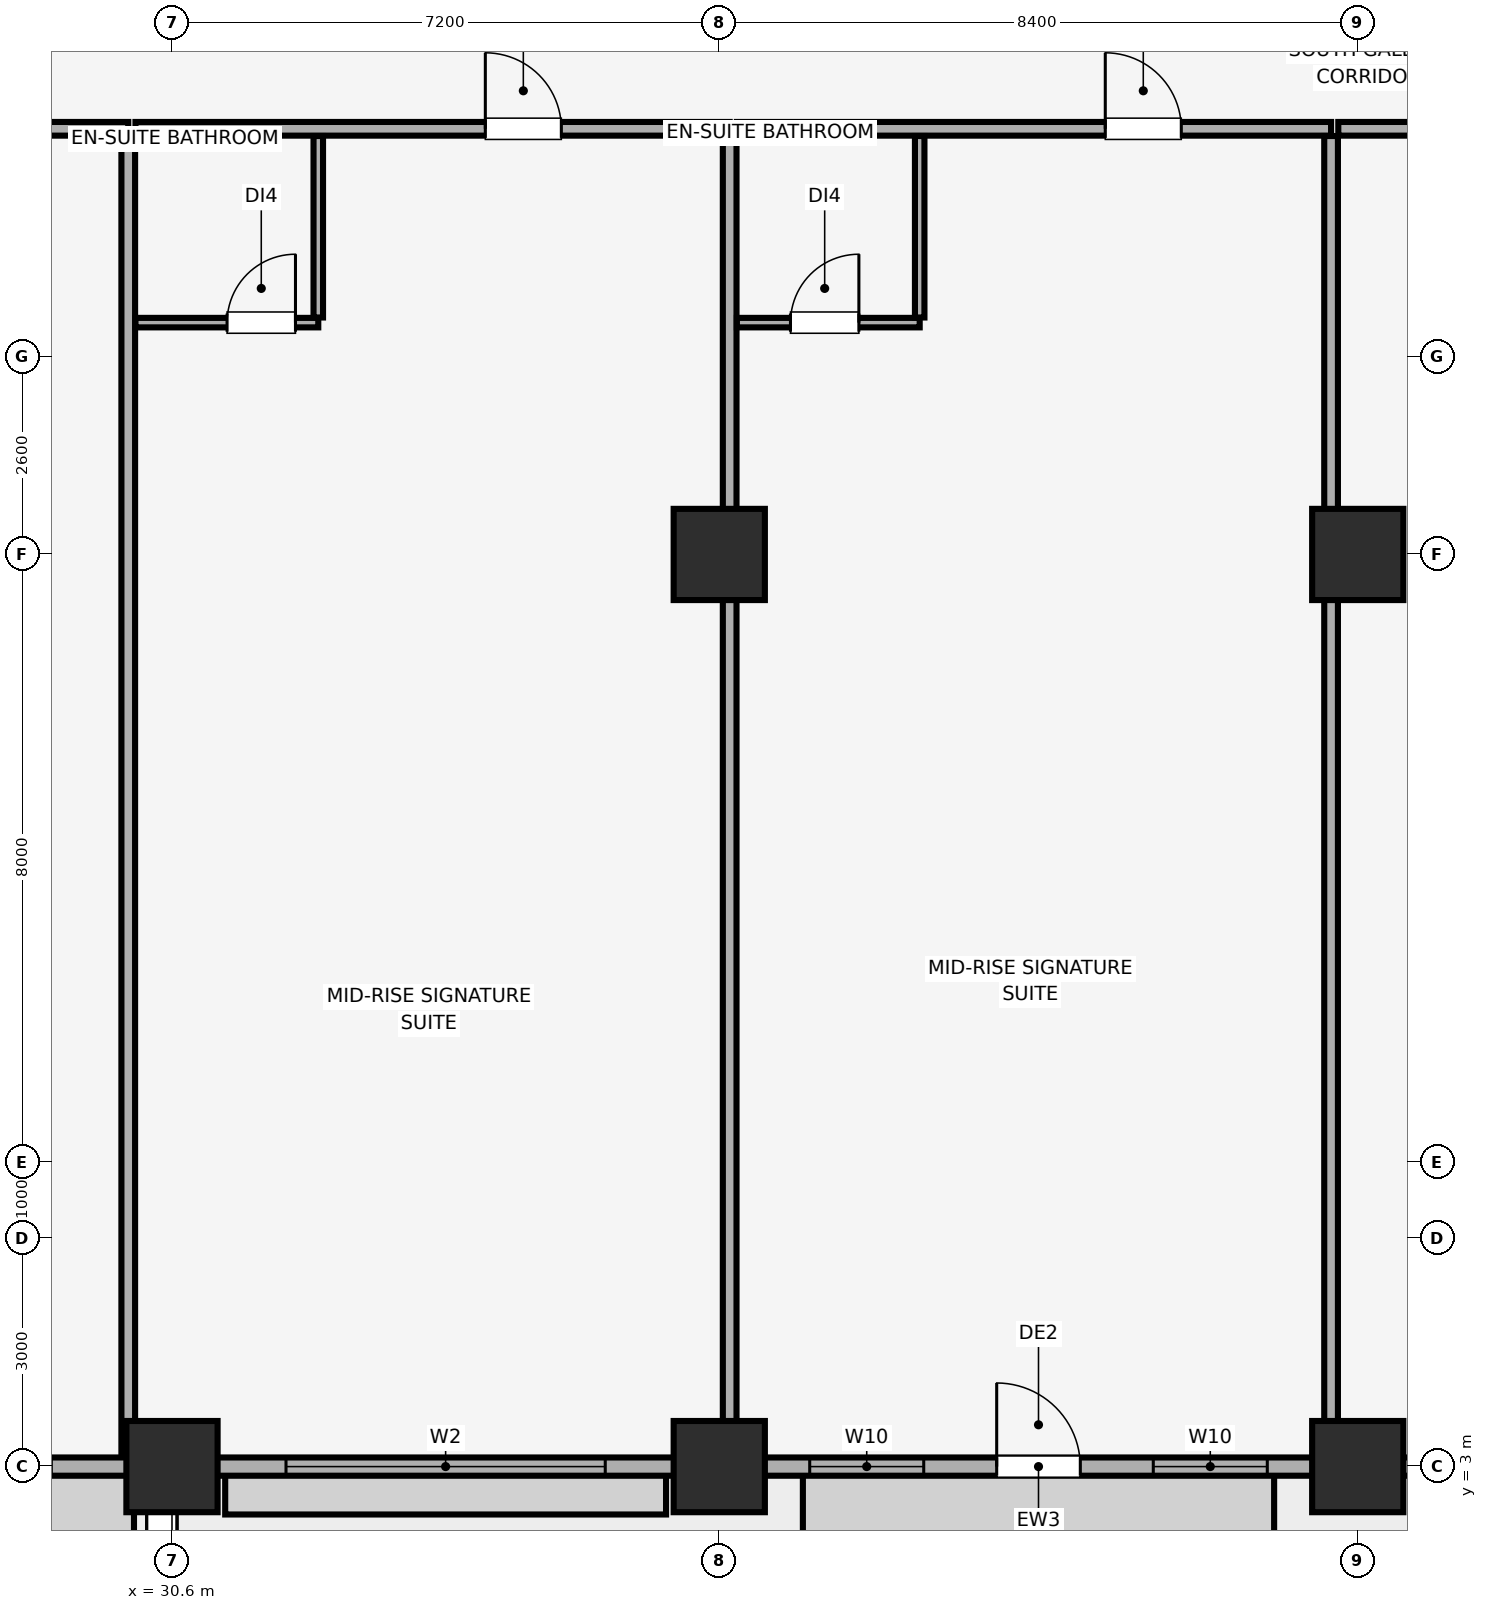
"""IFC4 building model, lengths in metres.
Left out: names, types, materials, properties, quantities, classifications, styles, units other than length and angle.
Written with IfcOpenShell. Run it as: python <this file> out.ifc"""

import sys

from ifc_helpers import new_model, si_unit, direction, frame, frame_2d, origin, origin_2d, place, context, subcontext, project, spatial, rectangle, extrude, element, fill, save


model = new_model("IFC4")
c1 = context("Model", 3, precision=1e-05, world=origin(), true_north=direction((0.0, 1.0)))
c2 = subcontext(c1, "Body", "Model", "MODEL_VIEW")
j1 = project(units=[si_unit("LENGTHUNIT", "METRE"), si_unit("PLANEANGLEUNIT", "RADIAN")], contexts=[c1])
p1 = place(None, origin())
s1 = spatial("IfcSite", under=j1, at=p1, CompositionType="ELEMENT")
p2 = place(p1, origin())
s2 = spatial("IfcBuilding", under=s1, at=p2, CompositionType="ELEMENT")
p3 = place(p2, frame((0.0, 0.0, 180.95)))
s3 = spatial("IfcBuildingStorey", under=s2, at=p3, CompositionType="ELEMENT", Elevation=180.95)
for number, where, z_axis, x_axis in (
    (1, (30.6, 3.0, 0.0), (0.0, 0.0, 1.0), (1.0, 0.0, 0.0)),
    (2, (37.8, 3.0, 0.0), (0.0, 0.0, 1.0), (1.0, 0.0, 0.0)),
    (3, (46.2, 3.0, 0.0), (0.0, 0.0, 1.0), (1.0, 0.0, 0.0)),
    (4, (37.8, 15.0, 0.0), (0.0, 0.0, 1.0), (1.0, 0.0, 0.0)),
    (5, (46.2, 15.0, 0.0), (0.0, 0.0, 1.0), (1.0, 0.0, 0.0)),
):
    element("IfcColumn", number, at=place(p3, frame(where, z_axis=z_axis, x_axis=x_axis)), inside=s3, PredefinedType="COLUMN", context=c2, shape_type="SweptSolid", body=[
        extrude(rectangle(XDim=1.2, YDim=1.2, at=origin_2d()), origin(), (0.0, 0.0, 1.0), 3.45),
    ])
p4 = place(p3, frame((7.0, 3.0, 0.0), z_axis=(0.0, 0.0, 1.0), x_axis=(1.0, 0.0, 0.0)))
e6 = element("IfcWall", 6, at=p4, inside=s3, PredefinedType="SOLIDWALL", context=c2, shape_type="SweptSolid", body=[
    extrude(rectangle(XDim=70.0, YDim=0.24, at=frame_2d((35.0, 0.0))), origin(), (0.0, 0.0, 1.0), 2.65),
])
p5 = place(p4, frame((11.383, 0.0, 0.0)))
e7 = element("IfcOpeningElement", 7, at=p5, cuts=e6, PredefinedType="OPENING", context=c2, shape_type="SweptSolid", body=[
    extrude(rectangle(XDim=1.1, YDim=2.15, at=frame_2d((0.55, 1.075))), frame((0.0, 0.13, 0.0), z_axis=(0.0, -1.0, 0.0), x_axis=(1.0, 0.0, 0.0)), (0.0, 0.0, 1.0), 0.26),
])
p6 = place(p4, frame((34.45, 0.0, 0.0)))
e8 = element("IfcOpeningElement", 8, at=p6, cuts=e6, PredefinedType="OPENING", context=c2, shape_type="SweptSolid", body=[
    extrude(rectangle(XDim=1.1, YDim=2.15, at=frame_2d((0.55, 1.075))), frame((0.0, 0.13, 0.0), z_axis=(0.0, -1.0, 0.0), x_axis=(1.0, 0.0, 0.0)), (0.0, 0.0, 1.0), 0.26),
])
p7 = place(p4, frame((57.517, 0.0, 0.0)))
e9 = element("IfcOpeningElement", 9, at=p7, cuts=e6, PredefinedType="OPENING", context=c2, shape_type="SweptSolid", body=[
    extrude(rectangle(XDim=1.1, YDim=2.15, at=frame_2d((0.55, 1.075))), frame((0.0, 0.13, 0.0), z_axis=(0.0, -1.0, 0.0), x_axis=(1.0, 0.0, 0.0)), (0.0, 0.0, 1.0), 0.26),
])
p8 = place(p4, frame((5.2, 0.0, 0.85)))
e10 = element("IfcOpeningElement", 10, at=p8, cuts=e6, PredefinedType="OPENING", context=c2, shape_type="SweptSolid", body=[
    extrude(rectangle(XDim=1.5, YDim=1.4, at=frame_2d((0.75, 0.7))), frame((0.0, 0.13, 0.0), z_axis=(0.0, -1.0, 0.0), x_axis=(1.0, 0.0, 0.0)), (0.0, 0.0, 1.0), 0.26),
])
p9 = place(p4, frame((13.133, 0.0, 0.85)))
e11 = element("IfcOpeningElement", 11, at=p9, cuts=e6, PredefinedType="OPENING", context=c2, shape_type="SweptSolid", body=[
    extrude(rectangle(XDim=1.5, YDim=1.4, at=frame_2d((0.75, 0.7))), frame((0.0, 0.13, 0.0), z_axis=(0.0, -1.0, 0.0), x_axis=(1.0, 0.0, 0.0)), (0.0, 0.0, 1.0), 0.26),
])
p10 = place(p4, frame((17.812, 0.0, 0.85)))
e12 = element("IfcOpeningElement", 12, at=p10, cuts=e6, PredefinedType="OPENING", context=c2, shape_type="SweptSolid", body=[
    extrude(rectangle(XDim=4.2, YDim=1.65, at=frame_2d((2.1, 0.825))), frame((0.0, 0.13, 0.0), z_axis=(0.0, -1.0, 0.0), x_axis=(1.0, 0.0, 0.0)), (0.0, 0.0, 1.0), 0.26),
])
p11 = place(p4, frame((25.1, 0.0, 0.85)))
e13 = element("IfcOpeningElement", 13, at=p11, cuts=e6, PredefinedType="OPENING", context=c2, shape_type="SweptSolid", body=[
    extrude(rectangle(XDim=4.2, YDim=1.65, at=frame_2d((2.1, 0.825))), frame((0.0, 0.13, 0.0), z_axis=(0.0, -1.0, 0.0), x_axis=(1.0, 0.0, 0.0)), (0.0, 0.0, 1.0), 0.26),
])
p12 = place(p4, frame((31.99, 0.0, 0.85)))
e14 = element("IfcOpeningElement", 14, at=p12, cuts=e6, PredefinedType="OPENING", context=c2, shape_type="SweptSolid", body=[
    extrude(rectangle(XDim=1.5, YDim=1.4, at=frame_2d((0.75, 0.7))), frame((0.0, 0.13, 0.0), z_axis=(0.0, -1.0, 0.0), x_axis=(1.0, 0.0, 0.0)), (0.0, 0.0, 1.0), 0.26),
])
p13 = place(p4, frame((36.51, 0.0, 0.85)))
e15 = element("IfcOpeningElement", 15, at=p13, cuts=e6, PredefinedType="OPENING", context=c2, shape_type="SweptSolid", body=[
    extrude(rectangle(XDim=1.5, YDim=1.4, at=frame_2d((0.75, 0.7))), frame((0.0, 0.13, 0.0), z_axis=(0.0, -1.0, 0.0), x_axis=(1.0, 0.0, 0.0)), (0.0, 0.0, 1.0), 0.26),
])
p14 = place(p4, frame((40.7, 0.0, 0.85)))
e16 = element("IfcOpeningElement", 16, at=p14, cuts=e6, PredefinedType="OPENING", context=c2, shape_type="SweptSolid", body=[
    extrude(rectangle(XDim=4.2, YDim=1.65, at=frame_2d((2.1, 0.825))), frame((0.0, 0.13, 0.0), z_axis=(0.0, -1.0, 0.0), x_axis=(1.0, 0.0, 0.0)), (0.0, 0.0, 1.0), 0.26),
])
p15 = place(p4, frame((47.9, 0.0, 0.85)))
e17 = element("IfcOpeningElement", 17, at=p15, cuts=e6, PredefinedType="OPENING", context=c2, shape_type="SweptSolid", body=[
    extrude(rectangle(XDim=4.2, YDim=1.65, at=frame_2d((2.1, 0.825))), frame((0.0, 0.13, 0.0), z_axis=(0.0, -1.0, 0.0), x_axis=(1.0, 0.0, 0.0)), (0.0, 0.0, 1.0), 0.26),
])
p16 = place(p4, frame((55.314, 0.0, 0.85)))
e18 = element("IfcOpeningElement", 18, at=p16, cuts=e6, PredefinedType="OPENING", context=c2, shape_type="SweptSolid", body=[
    extrude(rectangle(XDim=1.5, YDim=1.4, at=frame_2d((0.75, 0.7))), frame((0.0, 0.13, 0.0), z_axis=(0.0, -1.0, 0.0), x_axis=(1.0, 0.0, 0.0)), (0.0, 0.0, 1.0), 0.26),
])
p17 = place(p4, frame((63.3, 0.0, 0.85)))
e19 = element("IfcOpeningElement", 19, at=p17, cuts=e6, PredefinedType="OPENING", context=c2, shape_type="SweptSolid", body=[
    extrude(rectangle(XDim=1.5, YDim=1.4, at=frame_2d((0.75, 0.7))), frame((0.0, 0.13, 0.0), z_axis=(0.0, -1.0, 0.0), x_axis=(1.0, 0.0, 0.0)), (0.0, 0.0, 1.0), 0.26),
])
p18 = place(p3, frame((22.207, 20.6, 0.0), z_axis=(0.0, 0.0, 1.0), x_axis=(1.0, 0.0, 0.0)))
e20 = element("IfcWall", 20, at=p18, inside=s3, PredefinedType="PARTITIONING", context=c2, shape_type="SweptSolid", body=[
    extrude(rectangle(XDim=7.817, YDim=0.18, at=frame_2d((3.909, 0.0))), origin(), (0.0, 0.0, 1.0), 3.45),
])
p19 = place(p18, frame((4.959, 0.0, 0.0)))
e21 = element("IfcOpeningElement", 21, at=p19, cuts=e20, PredefinedType="OPENING", context=c2, shape_type="SweptSolid", body=[
    extrude(rectangle(XDim=1.0, YDim=2.15, at=frame_2d((0.5, 1.075))), frame((0.0, 0.1, 0.0), z_axis=(0.0, -1.0, 0.0), x_axis=(1.0, 0.0, 0.0)), (0.0, 0.0, 1.0), 0.2),
])
p20 = place(p3, frame((30.025, 3.15, 0.0), z_axis=(0.0, 0.0, 1.0), x_axis=(0.0, 1.0, 0.0)))
e22 = element("IfcWall", 22, at=p20, inside=s3, PredefinedType="PARTITIONING", context=c2, shape_type="SweptSolid", body=[
    extrude(rectangle(XDim=17.355, YDim=0.18, at=frame_2d((8.677, 0.0))), origin(), (0.0, 0.0, 1.0), 3.45),
])
p21 = place(p3, frame((30.12, 20.6, 0.0), z_axis=(0.0, 0.0, 1.0), x_axis=(1.0, 0.0, 0.0)))
e23 = element("IfcWall", 23, at=p21, inside=s3, PredefinedType="PARTITIONING", context=c2, shape_type="SweptSolid", body=[
    extrude(rectangle(XDim=7.817, YDim=0.18, at=frame_2d((3.909, 0.0))), origin(), (0.0, 0.0, 1.0), 3.45),
])
p22 = place(p21, frame((4.603, 0.0, 0.0)))
e24 = element("IfcOpeningElement", 24, at=p22, cuts=e23, PredefinedType="OPENING", context=c2, shape_type="SweptSolid", body=[
    extrude(rectangle(XDim=1.0, YDim=2.15, at=frame_2d((0.5, 1.075))), frame((0.0, 0.1, 0.0), z_axis=(0.0, -1.0, 0.0), x_axis=(1.0, 0.0, 0.0)), (0.0, 0.0, 1.0), 0.2),
])
p23 = place(p3, frame((37.937, 3.15, 0.0), z_axis=(0.0, 0.0, 1.0), x_axis=(0.0, 1.0, 0.0)))
e25 = element("IfcWall", 25, at=p23, inside=s3, PredefinedType="PARTITIONING", context=c2, shape_type="SweptSolid", body=[
    extrude(rectangle(XDim=17.355, YDim=0.18, at=frame_2d((8.677, 0.0))), origin(), (0.0, 0.0, 1.0), 2.85),
])
p24 = place(p3, frame((30.12, 18.05, 0.0), z_axis=(0.0, 0.0, 1.0), x_axis=(1.0, 0.0, 0.0)))
e26 = element("IfcWall", 26, at=p24, inside=s3, PredefinedType="PARTITIONING", context=c2, shape_type="SweptSolid", body=[
    extrude(rectangle(XDim=2.405, YDim=0.125, at=frame_2d((1.203, 0.0))), origin(), (0.0, 0.0, 1.0), 3.45),
])
p25 = place(p24, frame((1.205, 0.0, 0.0)))
e27 = element("IfcOpeningElement", 27, at=p25, cuts=e26, PredefinedType="OPENING", context=c2, shape_type="SweptSolid", body=[
    extrude(rectangle(XDim=0.9, YDim=2.1, at=frame_2d((0.45, 1.05))), frame((0.0, 0.073, 0.0), z_axis=(0.0, -1.0, 0.0), x_axis=(1.0, 0.0, 0.0)), (0.0, 0.0, 1.0), 0.145),
])
p26 = place(p3, frame((32.525, 18.117, 0.0), z_axis=(0.0, 0.0, 1.0), x_axis=(0.0, 1.0, 0.0)))
e28 = element("IfcWall", 28, at=p26, inside=s3, PredefinedType="PARTITIONING", context=c2, shape_type="SweptSolid", body=[
    extrude(rectangle(XDim=2.387, YDim=0.125, at=frame_2d((1.194, 0.0))), origin(), (0.0, 0.0, 1.0), 3.45),
])
p27 = place(p3, frame((38.032, 20.6, 0.0), z_axis=(0.0, 0.0, 1.0), x_axis=(1.0, 0.0, 0.0)))
e29 = element("IfcWall", 29, at=p27, inside=s3, PredefinedType="PARTITIONING", context=c2, shape_type="SweptSolid", body=[
    extrude(rectangle(XDim=7.817, YDim=0.18, at=frame_2d((3.909, 0.0))), origin(), (0.0, 0.0, 1.0), 3.45),
])
p28 = place(p27, frame((4.847, 0.0, 0.0)))
e30 = element("IfcOpeningElement", 30, at=p28, cuts=e29, PredefinedType="OPENING", context=c2, shape_type="SweptSolid", body=[
    extrude(rectangle(XDim=1.0, YDim=2.15, at=frame_2d((0.5, 1.075))), frame((0.0, 0.1, 0.0), z_axis=(0.0, -1.0, 0.0), x_axis=(1.0, 0.0, 0.0)), (0.0, 0.0, 1.0), 0.2),
])
p29 = place(p3, frame((45.849, 3.15, 0.0), z_axis=(0.0, 0.0, 1.0), x_axis=(0.0, 1.0, 0.0)))
e31 = element("IfcWall", 31, at=p29, inside=s3, PredefinedType="PARTITIONING", context=c2, shape_type="SweptSolid", body=[
    extrude(rectangle(XDim=17.355, YDim=0.18, at=frame_2d((8.677, 0.0))), origin(), (0.0, 0.0, 1.0), 3.45),
])
p30 = place(p3, frame((38.032, 18.05, 0.0), z_axis=(0.0, 0.0, 1.0), x_axis=(1.0, 0.0, 0.0)))
e32 = element("IfcWall", 32, at=p30, inside=s3, PredefinedType="PARTITIONING", context=c2, shape_type="SweptSolid", body=[
    extrude(rectangle(XDim=2.405, YDim=0.125, at=frame_2d((1.203, 0.0))), origin(), (0.0, 0.0, 1.0), 3.45),
])
p31 = place(p30, frame((0.705, 0.0, 0.0)))
e33 = element("IfcOpeningElement", 33, at=p31, cuts=e32, PredefinedType="OPENING", context=c2, shape_type="SweptSolid", body=[
    extrude(rectangle(XDim=0.9, YDim=2.1, at=frame_2d((0.45, 1.05))), frame((0.0, 0.073, 0.0), z_axis=(0.0, -1.0, 0.0), x_axis=(1.0, 0.0, 0.0)), (0.0, 0.0, 1.0), 0.145),
])
p32 = place(p3, frame((40.437, 18.117, 0.0), z_axis=(0.0, 0.0, 1.0), x_axis=(0.0, 1.0, 0.0)))
e34 = element("IfcWall", 34, at=p32, inside=s3, PredefinedType="PARTITIONING", context=c2, shape_type="SweptSolid", body=[
    extrude(rectangle(XDim=2.387, YDim=0.125, at=frame_2d((1.194, 0.0))), origin(), (0.0, 0.0, 1.0), 3.45),
])
p33 = place(p3, frame((45.944, 20.6, 0.0), z_axis=(0.0, 0.0, 1.0), x_axis=(1.0, 0.0, 0.0)))
e35 = element("IfcWall", 35, at=p33, inside=s3, PredefinedType="PARTITIONING", context=c2, shape_type="SweptSolid", body=[
    extrude(rectangle(XDim=7.817, YDim=0.18, at=frame_2d((3.909, 0.0))), origin(), (0.0, 0.0, 1.0), 3.45),
])
p34 = place(p33, frame((2.227, 0.0, 0.0)))
e36 = element("IfcOpeningElement", 36, at=p34, cuts=e35, PredefinedType="OPENING", context=c2, shape_type="SweptSolid", body=[
    extrude(rectangle(XDim=1.0, YDim=2.15, at=frame_2d((0.5, 1.075))), frame((0.0, 0.1, 0.0), z_axis=(0.0, -1.0, 0.0), x_axis=(1.0, 0.0, 0.0)), (0.0, 0.0, 1.0), 0.2),
])
p35 = place(p6, origin())
e37 = element("IfcDoor", 37, at=p35, inside=s3, OperationType="SINGLE_SWING_LEFT", PredefinedType="DOOR", context=c2, shape_type="SweptSolid", body=[
    extrude(rectangle(XDim=1.1, YDim=2.15, at=frame_2d((0.55, 1.075))), frame((0.0, 0.025, 0.0), z_axis=(0.0, -1.0, 0.0), x_axis=(1.0, 0.0, 0.0)), (0.0, 0.0, 1.0), 0.05),
])
fill(e8, e37)
p36 = place(p11, origin())
e38 = element("IfcWindow", 38, at=p36, inside=s3, PartitioningType="SINGLE_PANEL", PredefinedType="WINDOW", context=c2, shape_type="SweptSolid", body=[
    extrude(rectangle(XDim=4.2, YDim=1.65, at=frame_2d((2.1, 0.825))), frame((0.0, 0.03, 0.0), z_axis=(0.0, -1.0, 0.0), x_axis=(1.0, 0.0, 0.0)), (0.0, 0.0, 1.0), 0.06),
])
fill(e13, e38)
p37 = place(p12, origin())
e39 = element("IfcWindow", 39, at=p37, inside=s3, PartitioningType="SINGLE_PANEL", PredefinedType="WINDOW", context=c2, shape_type="SweptSolid", body=[
    extrude(rectangle(XDim=1.5, YDim=1.4, at=frame_2d((0.75, 0.7))), frame((0.0, 0.03, 0.0), z_axis=(0.0, -1.0, 0.0), x_axis=(1.0, 0.0, 0.0)), (0.0, 0.0, 1.0), 0.06),
])
fill(e14, e39)
p38 = place(p13, origin())
e40 = element("IfcWindow", 40, at=p38, inside=s3, PartitioningType="SINGLE_PANEL", PredefinedType="WINDOW", context=c2, shape_type="SweptSolid", body=[
    extrude(rectangle(XDim=1.5, YDim=1.4, at=frame_2d((0.75, 0.7))), frame((0.0, 0.03, 0.0), z_axis=(0.0, -1.0, 0.0), x_axis=(1.0, 0.0, 0.0)), (0.0, 0.0, 1.0), 0.06),
])
fill(e15, e40)
p39 = place(p22, origin())
e41 = element("IfcDoor", 41, at=p39, inside=s3, OperationType="SINGLE_SWING_LEFT", PredefinedType="DOOR", context=c2, shape_type="SweptSolid", body=[
    extrude(rectangle(XDim=1.0, YDim=2.15, at=frame_2d((0.5, 1.075))), frame((0.0, 0.025, 0.0), z_axis=(0.0, -1.0, 0.0), x_axis=(1.0, 0.0, 0.0)), (0.0, 0.0, 1.0), 0.05),
])
fill(e24, e41)
p40 = place(p25, origin())
e42 = element("IfcDoor", 42, at=p40, inside=s3, OperationType="SINGLE_SWING_RIGHT", PredefinedType="DOOR", context=c2, shape_type="SweptSolid", body=[
    extrude(rectangle(XDim=0.9, YDim=2.1, at=frame_2d((0.45, 1.05))), frame((0.0, 0.025, 0.0), z_axis=(0.0, -1.0, 0.0), x_axis=(1.0, 0.0, 0.0)), (0.0, 0.0, 1.0), 0.05),
])
fill(e27, e42)
p41 = place(p28, origin())
e43 = element("IfcDoor", 43, at=p41, inside=s3, OperationType="SINGLE_SWING_LEFT", PredefinedType="DOOR", context=c2, shape_type="SweptSolid", body=[
    extrude(rectangle(XDim=1.0, YDim=2.15, at=frame_2d((0.5, 1.075))), frame((0.0, 0.025, 0.0), z_axis=(0.0, -1.0, 0.0), x_axis=(1.0, 0.0, 0.0)), (0.0, 0.0, 1.0), 0.05),
])
fill(e30, e43)
p42 = place(p31, origin())
e44 = element("IfcDoor", 44, at=p42, inside=s3, OperationType="SINGLE_SWING_RIGHT", PredefinedType="DOOR", context=c2, shape_type="SweptSolid", body=[
    extrude(rectangle(XDim=0.9, YDim=2.1, at=frame_2d((0.45, 1.05))), frame((0.0, 0.025, 0.0), z_axis=(0.0, -1.0, 0.0), x_axis=(1.0, 0.0, 0.0)), (0.0, 0.0, 1.0), 0.05),
])
fill(e33, e44)
save(model, sys.argv[1])
